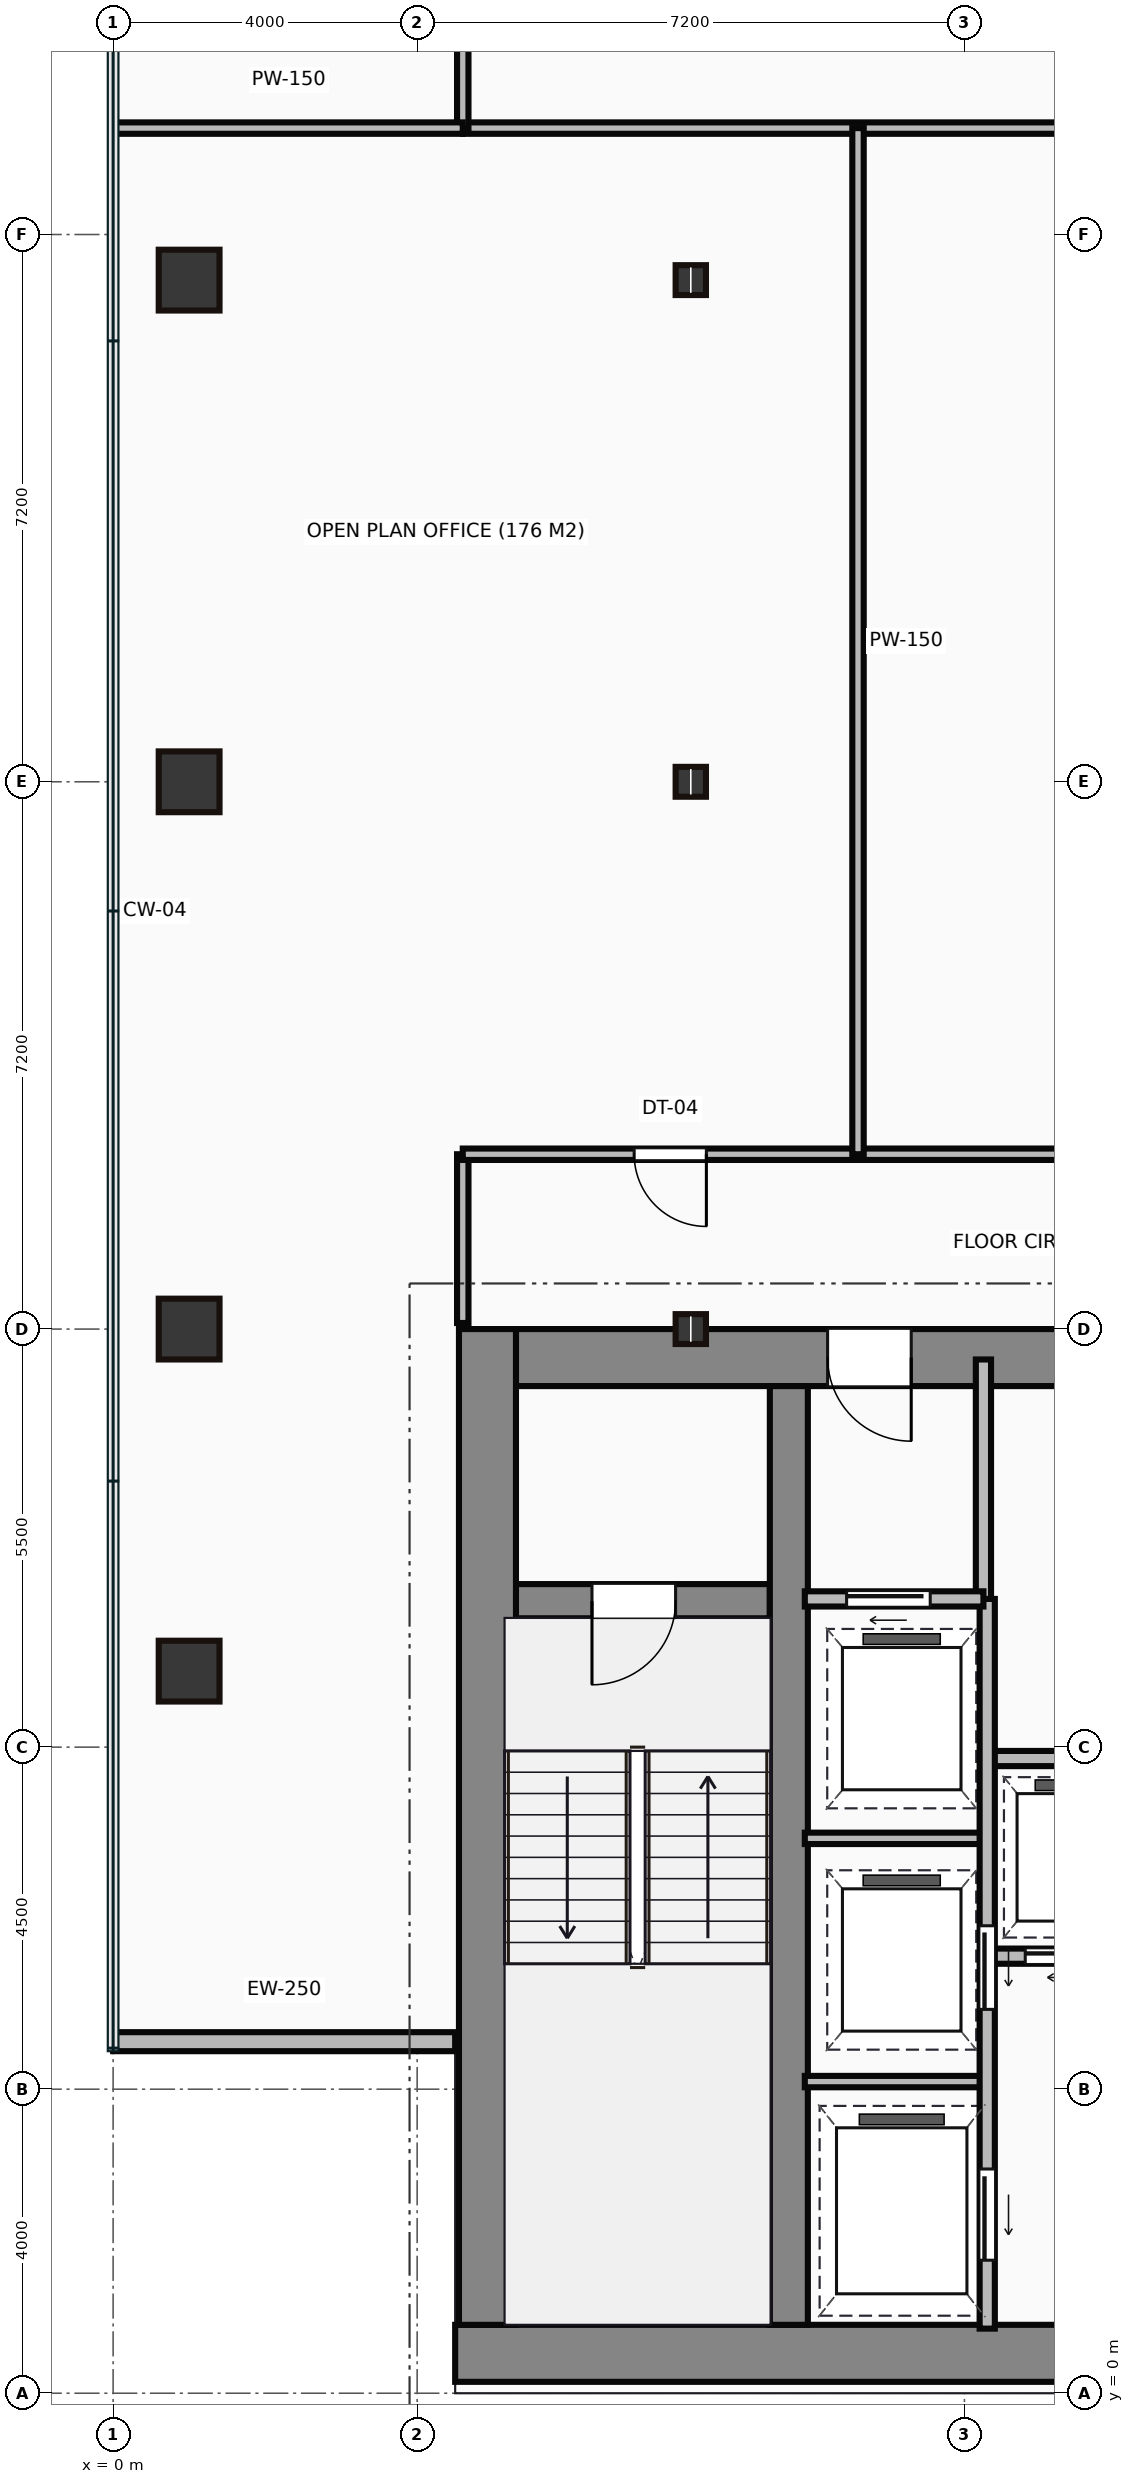
"""IFC4 building model, lengths in metres.
Left out: names, types, materials, properties, quantities, classifications, styles, units other than length and angle.
Written with IfcOpenShell. Run it as: python <this file> out.ifc"""

import sys

from ifc_helpers import new_model, si_unit, direction, frame, frame_2d, origin, origin_2d, place, context, subcontext, project, spatial, rectangle, hollow_rectangle, i_section, extrude, source, transform, mapped, element, fill, save


model = new_model("IFC4")
c1 = context("Model", 3, precision=1e-05, world=origin(), true_north=direction((0.0, 1.0)))
c2 = subcontext(c1, "Body", "Model", "MODEL_VIEW")
j1 = project(units=[si_unit("LENGTHUNIT", "METRE"), si_unit("PLANEANGLEUNIT", "RADIAN")], contexts=[c1])
p1 = place(None, origin())
s1 = spatial("IfcSite", under=j1, at=p1, CompositionType="ELEMENT")
p2 = place(p1, origin())
s2 = spatial("IfcBuilding", under=s1, at=p2, CompositionType="ELEMENT")
p3 = place(p2, frame((0.0, 0.0, 103.25)))
s3 = spatial("IfcBuildingStorey", under=s2, at=p3, CompositionType="ELEMENT", Elevation=103.25)
m1 = source(origin(), c2, "Body", "SweptSolid", [
    extrude(rectangle(XDim=29.5, YDim=0.75, at=frame_2d((14.75, 0.0))), origin(), (0.0, 0.0, 1.0), 3.65),
])
p4 = place(p3, frame((4.5, 0.525, 0.0), z_axis=(0.0, 0.0, 1.0), x_axis=(1.0, 0.0, 0.0)))
e1 = element("IfcWall", 1, at=p4, inside=s3, PredefinedType="SHEAR", context=c2, shape_type="MappedRepresentation", body=[
    mapped(m1, transform((0.0, 0.0, 0.0))),
])
m2 = source(origin(), c2, "Body", "SweptSolid", [
    extrude(rectangle(XDim=13.1, YDim=0.75, at=frame_2d((6.55, 0.0))), origin(), (0.0, 0.0, 1.0), 3.65),
])
p5 = place(p3, frame((4.925, 0.9, 0.0), z_axis=(0.0, 0.0, 1.0), x_axis=(0.0, 1.0, 0.0)))
e2 = element("IfcWall", 2, at=p5, inside=s3, PredefinedType="SHEAR", context=c2, shape_type="MappedRepresentation", body=[
    mapped(m2, transform((0.0, 0.0, 0.0))),
])
m3 = source(origin(), c2, "Body", "SweptSolid", [
    extrude(rectangle(XDim=9.1, YDim=0.75, at=frame_2d((4.55, 0.0))), origin(), (0.0, 0.0, 1.0), 3.65),
])
p6 = place(p3, frame((5.3, 13.625, 0.0), z_axis=(0.0, 0.0, 1.0), x_axis=(1.0, 0.0, 0.0)))
e3 = element("IfcWall", 3, at=p6, inside=s3, PredefinedType="SHEAR", context=c2, shape_type="MappedRepresentation", body=[
    mapped(m3, transform((0.0, 0.0, 0.0))),
])
p7 = place(p6, frame((4.1, 0.0, 0.0)))
e4 = element("IfcOpeningElement", 4, at=p7, cuts=e3, PredefinedType="OPENING", context=c2, shape_type="SweptSolid", body=[
    extrude(rectangle(XDim=1.1, YDim=2.15, at=frame_2d((0.55, 1.075))), frame((0.0, 0.385, 0.0), z_axis=(0.0, -1.0, 0.0), x_axis=(1.0, 0.0, 0.0)), (0.0, 0.0, 1.0), 0.77),
])
m4 = source(origin(), c2, "Body", "SweptSolid", [
    extrude(rectangle(XDim=12.35, YDim=0.5, at=frame_2d((6.175, 0.0))), origin(), (0.0, 0.0, 1.0), 3.65),
])
p8 = place(p3, frame((8.89, 0.9, 0.0), z_axis=(0.0, 0.0, 1.0), x_axis=(0.0, 1.0, 0.0)))
e5 = element("IfcWall", 5, at=p8, inside=s3, PredefinedType="SHEAR", context=c2, shape_type="MappedRepresentation", body=[
    mapped(m4, transform((0.0, 0.0, 0.0))),
])
m5 = source(origin(), c2, "Body", "SweptSolid", [
    extrude(rectangle(XDim=3.39, YDim=0.45, at=frame_2d((1.695, 0.0))), origin(), (0.0, 0.0, 1.0), 3.65),
])
p9 = place(p3, frame((5.25, 10.42, 0.0), z_axis=(0.0, 0.0, 1.0), x_axis=(1.0, 0.0, 0.0)))
e6 = element("IfcWall", 6, at=p9, inside=s3, PredefinedType="SHEAR", context=c2, shape_type="MappedRepresentation", body=[
    mapped(m5, transform((0.0, 0.0, 0.0))),
])
p10 = place(p9, frame((1.05, 0.0, 0.0)))
e7 = element("IfcOpeningElement", 7, at=p10, cuts=e6, PredefinedType="OPENING", context=c2, shape_type="SweptSolid", body=[
    extrude(rectangle(XDim=1.1, YDim=2.15, at=frame_2d((0.55, 1.075))), frame((0.0, 0.235, 0.0), z_axis=(0.0, -1.0, 0.0), x_axis=(1.0, 0.0, 0.0)), (0.0, 0.0, 1.0), 0.47),
])
m6 = source(origin(), c2, "Body", "SweptSolid", [
    extrude(hollow_rectangle(XDim=0.8, YDim=0.8, WallThickness=0.04, at=origin_2d()), origin(), (0.0, 0.0, 1.0), 3.65),
])
for number, where, z_axis, x_axis in (
    (8, (1.0, 9.5, 0.0), (0.0, 0.0, 1.0), (1.0, 0.0, 0.0)),
    (9, (1.0, 14.0, 0.0), (0.0, 0.0, 1.0), (1.0, 0.0, 0.0)),
    (10, (1.0, 21.2, 0.0), (0.0, 0.0, 1.0), (1.0, 0.0, 0.0)),
    (11, (1.0, 27.8, 0.0), (0.0, 0.0, 1.0), (1.0, 0.0, 0.0)),
):
    element("IfcColumn", number, at=place(p3, frame(where, z_axis=z_axis, x_axis=x_axis)), inside=s3, PredefinedType="COLUMN", context=c2, shape_type="MappedRepresentation", body=[
        mapped(m6, transform((0.0, 0.0, 0.0))),
    ])
m7 = source(origin(), c2, "Body", "SweptSolid", [
    extrude(i_section(OverallWidth=0.399, OverallDepth=0.393, WebThickness=0.023, FlangeThickness=0.037, at=origin_2d()), origin(), (0.0, 0.0, 1.0), 3.65),
])
for number, where, z_axis, x_axis in (
    (12, (7.6, 14.0, 0.0), (0.0, 0.0, 1.0), (1.0, 0.0, 0.0)),
    (13, (7.6, 21.2, 0.0), (0.0, 0.0, 1.0), (1.0, 0.0, 0.0)),
    (14, (7.6, 27.8, 0.0), (0.0, 0.0, 1.0), (1.0, 0.0, 0.0)),
):
    element("IfcColumn", number, at=place(p3, frame(where, z_axis=z_axis, x_axis=x_axis)), inside=s3, PredefinedType="COLUMN", context=c2, shape_type="MappedRepresentation", body=[
        mapped(m7, transform((0.0, 0.0, 0.0))),
    ])
m8 = source(origin(), c2, "Body", "SweptSolid", [
    extrude(rectangle(XDim=4.5, YDim=0.25, at=frame_2d((2.25, 0.0))), origin(), (0.0, 0.0, 1.0), 3.4),
])
p11 = place(p3, frame((0.0, 4.625, 0.0), z_axis=(0.0, 0.0, 1.0), x_axis=(1.0, 0.0, 0.0)))
e15 = element("IfcWall", 15, at=p11, inside=s3, PredefinedType="STANDARD", context=c2, shape_type="MappedRepresentation", body=[
    mapped(m8, transform((0.0, 0.0, 0.0))),
])
m9 = source(origin(), c2, "Body", "SweptSolid", [
    extrude(rectangle(XDim=3.18, YDim=0.2, at=frame_2d((1.59, 0.0))), origin(), (0.0, 0.0, 1.0), 3.4),
])
p12 = place(p3, frame((11.45, 10.42, 0.0), z_axis=(0.0, 0.0, 1.0), x_axis=(0.0, 1.0, 0.0)))
e16 = element("IfcWall", 16, at=p12, inside=s3, PredefinedType="PARTITIONING", context=c2, shape_type="MappedRepresentation", body=[
    mapped(m9, transform((0.0, 0.0, 0.0))),
])
m10 = source(origin(), c2, "Body", "SweptSolid", [
    extrude(rectangle(XDim=2.35, YDim=0.2, at=frame_2d((1.175, 0.0))), origin(), (0.0, 0.0, 1.0), 3.4),
])
p13 = place(p3, frame((9.1, 10.45, 0.0), z_axis=(0.0, 0.0, 1.0), x_axis=(1.0, 0.0, 0.0)))
e17 = element("IfcWall", 17, at=p13, inside=s3, PredefinedType="PARTITIONING", context=c2, shape_type="MappedRepresentation", body=[
    mapped(m10, transform((0.0, 0.0, 0.0))),
])
p14 = place(p13, frame((0.55, 0.0, 0.0)))
e18 = element("IfcOpeningElement", 18, at=p14, cuts=e17, PredefinedType="OPENING", context=c2, shape_type="SweptSolid", body=[
    extrude(rectangle(XDim=1.1, YDim=2.15, at=frame_2d((0.55, 1.075))), frame((0.0, 0.11, 0.0), z_axis=(0.0, -1.0, 0.0), x_axis=(1.0, 0.0, 0.0)), (0.0, 0.0, 1.0), 0.22),
])
m11 = source(origin(), c2, "Body", "SweptSolid", [
    extrude(rectangle(XDim=9.6, YDim=0.2, at=frame_2d((4.8, 0.0))), origin(), (0.0, 0.0, 1.0), 3.4),
])
p15 = place(p3, frame((11.5, 0.85, 0.0), z_axis=(0.0, 0.0, 1.0), x_axis=(0.0, 1.0, 0.0)))
e19 = element("IfcWall", 19, at=p15, inside=s3, PredefinedType="PARTITIONING", context=c2, shape_type="MappedRepresentation", body=[
    mapped(m11, transform((0.0, 0.0, 0.0))),
])
p16 = place(p15, frame((4.2, 0.0, 0.0)))
e20 = element("IfcOpeningElement", 20, at=p16, cuts=e19, PredefinedType="OPENING", context=c2, shape_type="SweptSolid", body=[
    extrude(rectangle(XDim=1.1, YDim=2.15, at=frame_2d((0.55, 1.075))), frame((0.0, 0.11, 0.0), z_axis=(0.0, -1.0, 0.0), x_axis=(1.0, 0.0, 0.0)), (0.0, 0.0, 1.0), 0.22),
])
p17 = place(p15, frame((0.9, 0.0, 0.0)))
e21 = element("IfcOpeningElement", 21, at=p17, cuts=e19, PredefinedType="OPENING", context=c2, shape_type="SweptSolid", body=[
    extrude(rectangle(XDim=1.2, YDim=2.15, at=frame_2d((0.6, 1.075))), frame((0.0, 0.11, 0.0), z_axis=(0.0, -1.0, 0.0), x_axis=(1.0, 0.0, 0.0)), (0.0, 0.0, 1.0), 0.22),
])
m12 = source(origin(), c2, "Body", "SweptSolid", [
    extrude(rectangle(XDim=2.4, YDim=0.15, at=frame_2d((1.2, 0.0))), origin(), (0.0, 0.0, 1.0), 3.4),
])
for number, where, z_axis, x_axis in (
    (22, (9.1, 4.1, 0.0), (0.0, 0.0, 1.0), (1.0, 0.0, 0.0)),
    (23, (9.1, 7.3, 0.0), (0.0, 0.0, 1.0), (1.0, 0.0, 0.0)),
):
    element("IfcWall", number, at=place(p3, frame(where, z_axis=z_axis, x_axis=x_axis)), inside=s3, PredefinedType="PARTITIONING", context=c2, shape_type="MappedRepresentation", body=[
        mapped(m12, transform((0.0, 0.0, 0.0))),
    ])
m13 = source(origin(), c2, "Body", "SweptSolid", [
    extrude(rectangle(XDim=11.85, YDim=0.2, at=frame_2d((5.925, 0.0))), origin(), (0.0, 0.0, 1.0), 3.4),
])
p18 = place(p3, frame((11.55, 5.75, 0.0), z_axis=(0.0, 0.0, 1.0), x_axis=(1.0, 0.0, 0.0)))
e24 = element("IfcWall", 24, at=p18, inside=s3, PredefinedType="PARTITIONING", context=c2, shape_type="MappedRepresentation", body=[
    mapped(m13, transform((0.0, 0.0, 0.0))),
])
p19 = place(p18, frame((0.45, 0.0, 0.0)))
e25 = element("IfcOpeningElement", 25, at=p19, cuts=e24, PredefinedType="OPENING", context=c2, shape_type="SweptSolid", body=[
    extrude(rectangle(XDim=1.05, YDim=2.15, at=frame_2d((0.525, 1.075))), frame((0.0, 0.11, 0.0), z_axis=(0.0, -1.0, 0.0), x_axis=(1.0, 0.0, 0.0)), (0.0, 0.0, 1.0), 0.22),
])
p20 = place(p18, frame((2.4, 0.0, 0.0)))
e26 = element("IfcOpeningElement", 26, at=p20, cuts=e24, PredefinedType="OPENING", context=c2, shape_type="SweptSolid", body=[
    extrude(rectangle(XDim=1.05, YDim=2.15, at=frame_2d((0.525, 1.075))), frame((0.0, 0.11, 0.0), z_axis=(0.0, -1.0, 0.0), x_axis=(1.0, 0.0, 0.0)), (0.0, 0.0, 1.0), 0.22),
])
p21 = place(p18, frame((4.35, 0.0, 0.0)))
e27 = element("IfcOpeningElement", 27, at=p21, cuts=e24, PredefinedType="OPENING", context=c2, shape_type="SweptSolid", body=[
    extrude(rectangle(XDim=1.05, YDim=2.15, at=frame_2d((0.525, 1.075))), frame((0.0, 0.11, 0.0), z_axis=(0.0, -1.0, 0.0), x_axis=(1.0, 0.0, 0.0)), (0.0, 0.0, 1.0), 0.22),
])
p22 = place(p18, frame((6.3, 0.0, 0.0)))
e28 = element("IfcOpeningElement", 28, at=p22, cuts=e24, PredefinedType="OPENING", context=c2, shape_type="SweptSolid", body=[
    extrude(rectangle(XDim=1.05, YDim=2.15, at=frame_2d((0.525, 1.075))), frame((0.0, 0.11, 0.0), z_axis=(0.0, -1.0, 0.0), x_axis=(1.0, 0.0, 0.0)), (0.0, 0.0, 1.0), 0.22),
])
p23 = place(p18, frame((8.25, 0.0, 0.0)))
e29 = element("IfcOpeningElement", 29, at=p23, cuts=e24, PredefinedType="OPENING", context=c2, shape_type="SweptSolid", body=[
    extrude(rectangle(XDim=1.05, YDim=2.15, at=frame_2d((0.525, 1.075))), frame((0.0, 0.11, 0.0), z_axis=(0.0, -1.0, 0.0), x_axis=(1.0, 0.0, 0.0)), (0.0, 0.0, 1.0), 0.22),
])
p24 = place(p18, frame((10.2, 0.0, 0.0)))
e30 = element("IfcOpeningElement", 30, at=p24, cuts=e24, PredefinedType="OPENING", context=c2, shape_type="SweptSolid", body=[
    extrude(rectangle(XDim=1.05, YDim=2.15, at=frame_2d((0.525, 1.075))), frame((0.0, 0.11, 0.0), z_axis=(0.0, -1.0, 0.0), x_axis=(1.0, 0.0, 0.0)), (0.0, 0.0, 1.0), 0.22),
])
p25 = place(p3, frame((11.55, 8.35, 0.0), z_axis=(0.0, 0.0, 1.0), x_axis=(1.0, 0.0, 0.0)))
e31 = element("IfcWall", 31, at=p25, inside=s3, PredefinedType="PARTITIONING", context=c2, shape_type="MappedRepresentation", body=[
    mapped(m13, transform((0.0, 0.0, 0.0))),
])
m14 = source(origin(), c2, "Body", "SweptSolid", [
    extrude(rectangle(XDim=2.22, YDim=0.15, at=frame_2d((1.11, 0.0))), origin(), (0.0, 0.0, 1.0), 3.4),
])
p26 = place(p3, frame((4.6, 14.08, 0.0), z_axis=(0.0, 0.0, 1.0), x_axis=(0.0, 1.0, 0.0)))
e32 = element("IfcWall", 32, at=p26, inside=s3, PredefinedType="PARTITIONING", context=c2, shape_type="MappedRepresentation", body=[
    mapped(m14, transform((0.0, 0.0, 0.0))),
])
m15 = source(origin(), c2, "Body", "SweptSolid", [
    extrude(rectangle(XDim=32.6, YDim=0.15, at=frame_2d((16.3, 0.0))), origin(), (0.0, 0.0, 1.0), 3.4),
])
p27 = place(p3, frame((4.6, 16.3, 0.0), z_axis=(0.0, 0.0, 1.0), x_axis=(1.0, 0.0, 0.0)))
e33 = element("IfcWall", 33, at=p27, inside=s3, PredefinedType="PARTITIONING", context=c2, shape_type="MappedRepresentation", body=[
    mapped(m15, transform((0.0, 0.0, 0.0))),
])
p28 = place(p27, frame((2.255, 0.0, 0.0)))
e34 = element("IfcOpeningElement", 34, at=p28, cuts=e33, PredefinedType="OPENING", context=c2, shape_type="SweptSolid", body=[
    extrude(rectangle(XDim=0.95, YDim=2.15, at=frame_2d((0.475, 1.075))), frame((0.0, 0.085, 0.0), z_axis=(0.0, -1.0, 0.0), x_axis=(1.0, 0.0, 0.0)), (0.0, 0.0, 1.0), 0.17),
])
p29 = place(p3, frame((37.2, 29.8, 0.0), z_axis=(0.0, 0.0, 1.0), x_axis=(-1.0, 0.0, 0.0)))
e35 = element("IfcWall", 35, at=p29, inside=s3, PredefinedType="PARTITIONING", context=c2, shape_type="MappedRepresentation", body=[
    mapped(m15, transform((0.0, 0.0, 0.0))),
])
p30 = place(p29, frame((22.025, 0.0, 0.0)))
e36 = element("IfcOpeningElement", 36, at=p30, cuts=e35, PredefinedType="OPENING", context=c2, shape_type="SweptSolid", body=[
    extrude(rectangle(XDim=0.95, YDim=2.15, at=frame_2d((0.475, 1.075))), frame((0.0, 0.085, 0.0), z_axis=(0.0, -1.0, 0.0), x_axis=(1.0, 0.0, 0.0)), (0.0, 0.0, 1.0), 0.17),
])
p31 = place(p29, frame((12.025, 0.0, 0.0)))
e37 = element("IfcOpeningElement", 37, at=p31, cuts=e35, PredefinedType="OPENING", context=c2, shape_type="SweptSolid", body=[
    extrude(rectangle(XDim=0.95, YDim=2.15, at=frame_2d((0.475, 1.075))), frame((0.0, 0.085, 0.0), z_axis=(0.0, -1.0, 0.0), x_axis=(1.0, 0.0, 0.0)), (0.0, 0.0, 1.0), 0.17),
])
m16 = source(origin(), c2, "Body", "SweptSolid", [
    extrude(rectangle(XDim=2.1, YDim=0.15, at=frame_2d((1.05, 0.0))), origin(), (0.0, 0.0, 1.0), 3.4),
])
p32 = place(p3, frame((4.6, 29.8, 0.0), z_axis=(0.0, 0.0, 1.0), x_axis=(0.0, 1.0, 0.0)))
e38 = element("IfcWall", 38, at=p32, inside=s3, PredefinedType="PARTITIONING", context=c2, shape_type="MappedRepresentation", body=[
    mapped(m16, transform((0.0, 0.0, 0.0))),
])
m17 = source(origin(), c2, "Body", "SweptSolid", [
    extrude(rectangle(XDim=4.58, YDim=0.15, at=frame_2d((2.29, 0.0))), origin(), (0.0, 0.0, 1.0), 3.4),
])
p33 = place(p3, frame((0.02, 29.8, 0.0), z_axis=(0.0, 0.0, 1.0), x_axis=(1.0, 0.0, 0.0)))
e39 = element("IfcWall", 39, at=p33, inside=s3, PredefinedType="PARTITIONING", context=c2, shape_type="MappedRepresentation", body=[
    mapped(m17, transform((0.0, 0.0, 0.0))),
])
m18 = source(origin(), c2, "Body", "SweptSolid", [
    extrude(rectangle(XDim=13.5, YDim=0.15, at=frame_2d((6.75, 0.0))), origin(), (0.0, 0.0, 1.0), 3.4),
])
p34 = place(p3, frame((9.8, 29.8, 0.0), z_axis=(0.0, 0.0, 1.0), x_axis=(0.0, -1.0, 0.0)))
e40 = element("IfcWall", 40, at=p34, inside=s3, PredefinedType="PARTITIONING", context=c2, shape_type="MappedRepresentation", body=[
    mapped(m18, transform((0.0, 0.0, 0.0))),
])
m19 = source(origin(), c2, "Body", "SweptSolid", [
    extrude(rectangle(XDim=1.1, YDim=2.15, at=frame_2d((0.55, 1.075))), frame((0.0, 0.025, 0.0), z_axis=(0.0, -1.0, 0.0), x_axis=(1.0, 0.0, 0.0)), (0.0, 0.0, 1.0), 0.05),
])
p35 = place(p10, frame((1.1, 0.0, 0.0), z_axis=(0.0, 0.0, 1.0), x_axis=(-1.0, 0.0, 0.0)))
e41 = element("IfcDoor", 41, at=p35, inside=s3, OperationType="SINGLE_SWING_LEFT", PredefinedType="DOOR", context=c2, shape_type="MappedRepresentation", body=[
    mapped(m19, transform((0.0, 0.0, 0.0))),
])
fill(e7, e41)
p36 = place(p7, origin())
e42 = element("IfcDoor", 42, at=p36, inside=s3, OperationType="SINGLE_SWING_RIGHT", PredefinedType="DOOR", context=c2, shape_type="MappedRepresentation", body=[
    mapped(m19, transform((0.0, 0.0, 0.0))),
])
fill(e4, e42)
p37 = place(p14, origin())
e43 = element("IfcDoor", 43, at=p37, inside=s3, OperationType="SLIDING_TO_LEFT", PredefinedType="DOOR", context=c2, shape_type="MappedRepresentation", body=[
    mapped(m19, transform((0.0, 0.0, 0.0))),
])
fill(e18, e43)
p38 = place(p16, frame((1.1, 0.0, 0.0), z_axis=(0.0, 0.0, 1.0), x_axis=(-1.0, 0.0, 0.0)))
e44 = element("IfcDoor", 44, at=p38, inside=s3, OperationType="SLIDING_TO_LEFT", PredefinedType="DOOR", context=c2, shape_type="MappedRepresentation", body=[
    mapped(m19, transform((0.0, 0.0, 0.0))),
])
fill(e20, e44)
m20 = source(origin(), c2, "Body", "SweptSolid", [
    extrude(rectangle(XDim=1.2, YDim=2.15, at=frame_2d((0.6, 1.075))), frame((0.0, 0.025, 0.0), z_axis=(0.0, -1.0, 0.0), x_axis=(1.0, 0.0, 0.0)), (0.0, 0.0, 1.0), 0.05),
])
p39 = place(p17, frame((1.2, 0.0, 0.0), z_axis=(0.0, 0.0, 1.0), x_axis=(-1.0, 0.0, 0.0)))
e45 = element("IfcDoor", 45, at=p39, inside=s3, OperationType="SLIDING_TO_LEFT", PredefinedType="DOOR", context=c2, shape_type="MappedRepresentation", body=[
    mapped(m20, transform((0.0, 0.0, 0.0))),
])
fill(e21, e45)
m21 = source(origin(), c2, "Body", "SweptSolid", [
    extrude(rectangle(XDim=1.05, YDim=2.15, at=frame_2d((0.525, 1.075))), frame((0.0, 0.025, 0.0), z_axis=(0.0, -1.0, 0.0), x_axis=(1.0, 0.0, 0.0)), (0.0, 0.0, 1.0), 0.05),
])
p40 = place(p19, frame((1.05, 0.0, 0.0), z_axis=(0.0, 0.0, 1.0), x_axis=(-1.0, 0.0, 0.0)))
e46 = element("IfcDoor", 46, at=p40, inside=s3, OperationType="SLIDING_TO_LEFT", PredefinedType="DOOR", context=c2, shape_type="MappedRepresentation", body=[
    mapped(m21, transform((0.0, 0.0, 0.0))),
])
fill(e25, e46)
m22 = source(origin(), c2, "Body", "SweptSolid", [
    extrude(rectangle(XDim=0.95, YDim=2.15, at=frame_2d((0.475, 1.075))), frame((0.0, 0.025, 0.0), z_axis=(0.0, -1.0, 0.0), x_axis=(1.0, 0.0, 0.0)), (0.0, 0.0, 1.0), 0.05),
])
p41 = place(p28, origin())
e47 = element("IfcDoor", 47, at=p41, inside=s3, OperationType="SINGLE_SWING_RIGHT", PredefinedType="DOOR", context=c2, shape_type="MappedRepresentation", body=[
    mapped(m22, transform((0.0, 0.0, 0.0))),
])
fill(e34, e47)
save(model, sys.argv[1])
